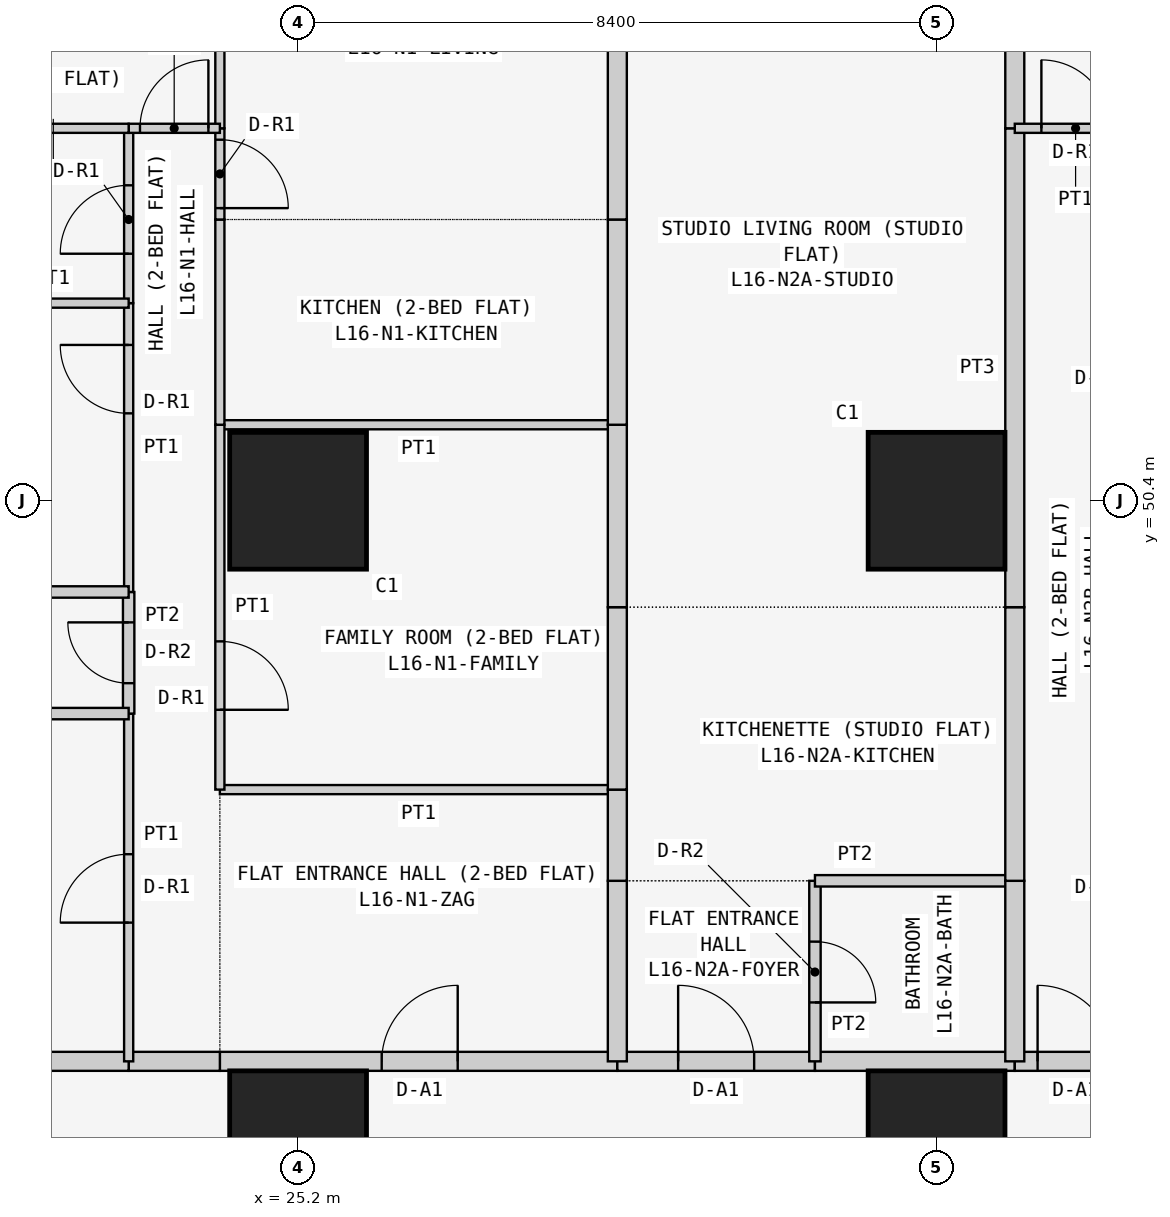
"""IFC4 building model, lengths in metres.
Left out: names, types, materials, properties, quantities, classifications, styles, units other than length and angle.
Written with IfcOpenShell. Run it as: python <this file> out.ifc"""

import sys

from ifc_helpers import new_model, si_unit, direction, frame, frame_2d, origin, origin_2d, place, context, subcontext, project, spatial, rectangle, extrude, element, fill, save


model = new_model("IFC4")
c1 = context("Model", 3, precision=1e-05, world=origin(), true_north=direction((0.0, 1.0)))
c2 = subcontext(c1, "Body", "Model", "MODEL_VIEW")
j1 = project(units=[si_unit("LENGTHUNIT", "METRE"), si_unit("PLANEANGLEUNIT", "RADIAN")], contexts=[c1])
p1 = place(None, origin())
s1 = spatial("IfcSite", under=j1, at=p1, CompositionType="ELEMENT")
p2 = place(p1, origin())
s2 = spatial("IfcBuilding", under=s1, at=p2, CompositionType="ELEMENT")
p3 = place(p2, frame((0.0, 0.0, 66.9)))
s3 = spatial("IfcBuildingStorey", under=s2, at=p3, CompositionType="ELEMENT", Elevation=66.9)
for number, where, z_axis, x_axis in (
    (1, (25.2, 42.0, 0.0), (0.0, 0.0, 1.0), (1.0, 0.0, 0.0)),
    (2, (25.2, 50.4, 0.0), (0.0, 0.0, 1.0), (1.0, 0.0, 0.0)),
    (3, (33.6, 42.0, 0.0), (0.0, 0.0, 1.0), (1.0, 0.0, 0.0)),
    (4, (33.6, 50.4, 0.0), (0.0, 0.0, 1.0), (1.0, 0.0, 0.0)),
):
    element("IfcColumn", number, at=place(p3, frame(where, z_axis=z_axis, x_axis=x_axis)), inside=s3, PredefinedType="COLUMN", context=c2, shape_type="SweptSolid", body=[
        extrude(rectangle(XDim=1.8, YDim=1.8, at=origin_2d()), origin(), (0.0, 0.0, 1.0), 3.6),
    ])
p4 = place(p3, frame((24.171, 43.025, 0.0), z_axis=(0.0, 0.0, 1.0), x_axis=(1.0, 0.0, 0.0)))
e5 = element("IfcWall", 5, at=p4, inside=s3, PredefinedType="PARTITIONING", context=c2, shape_type="SweptSolid", body=[
    extrude(rectangle(XDim=5.229, YDim=0.25, at=frame_2d((2.615, 0.0))), origin(), (0.0, 0.0, 1.0), 3.45),
])
p5 = place(p4, frame((2.129, 0.0, 0.0)))
e6 = element("IfcOpeningElement", 6, at=p5, cuts=e5, PredefinedType="OPENING", context=c2, shape_type="SweptSolid", body=[
    extrude(rectangle(XDim=1.0, YDim=2.1, at=frame_2d((0.5, 1.05))), frame((0.0, 0.135, 0.0), z_axis=(0.0, -1.0, 0.0), x_axis=(1.0, 0.0, 0.0)), (0.0, 0.0, 1.0), 0.27),
])
p6 = place(p3, frame((22.971, 43.025, 0.0), z_axis=(0.0, 0.0, 1.0), x_axis=(1.0, 0.0, 0.0)))
e7 = element("IfcWall", 7, at=p6, inside=s3, PredefinedType="PARTITIONING", context=c2, shape_type="SweptSolid", body=[
    extrude(rectangle(XDim=1.2, YDim=0.25, at=frame_2d((0.6, 0.0))), origin(), (0.0, 0.0, 1.0), 3.45),
])
p7 = place(p3, frame((16.1, 43.025, 0.0), z_axis=(0.0, 0.0, 1.0), x_axis=(1.0, 0.0, 0.0)))
e8 = element("IfcWall", 8, at=p7, inside=s3, PredefinedType="PARTITIONING", context=c2, shape_type="SweptSolid", body=[
    extrude(rectangle(XDim=6.871, YDim=0.25, at=frame_2d((3.436, 0.0))), origin(), (0.0, 0.0, 1.0), 3.45),
])
p8 = place(p3, frame((29.4, 43.025, 0.0), z_axis=(0.0, 0.0, 1.0), x_axis=(1.0, 0.0, 0.0)))
e9 = element("IfcWall", 9, at=p8, inside=s3, PredefinedType="PARTITIONING", context=c2, shape_type="SweptSolid", body=[
    extrude(rectangle(XDim=2.6, YDim=0.25, at=frame_2d((1.3, 0.0))), origin(), (0.0, 0.0, 1.0), 3.45),
])
p9 = place(p8, frame((0.8, 0.0, 0.0)))
e10 = element("IfcOpeningElement", 10, at=p9, cuts=e9, PredefinedType="OPENING", context=c2, shape_type="SweptSolid", body=[
    extrude(rectangle(XDim=1.0, YDim=2.1, at=frame_2d((0.5, 1.05))), frame((0.0, 0.135, 0.0), z_axis=(0.0, -1.0, 0.0), x_axis=(1.0, 0.0, 0.0)), (0.0, 0.0, 1.0), 0.27),
])
p10 = place(p3, frame((32.0, 43.025, 0.0), z_axis=(0.0, 0.0, 1.0), x_axis=(1.0, 0.0, 0.0)))
e11 = element("IfcWall", 11, at=p10, inside=s3, PredefinedType="PARTITIONING", context=c2, shape_type="SweptSolid", body=[
    extrude(rectangle(XDim=2.629, YDim=0.25, at=frame_2d((1.314, 0.0))), origin(), (0.0, 0.0, 1.0), 3.45),
])
p11 = place(p3, frame((34.629, 43.025, 0.0), z_axis=(0.0, 0.0, 1.0), x_axis=(1.0, 0.0, 0.0)))
e12 = element("IfcWall", 12, at=p11, inside=s3, PredefinedType="PARTITIONING", context=c2, shape_type="SweptSolid", body=[
    extrude(rectangle(XDim=1.6, YDim=0.25, at=frame_2d((0.8, 0.0))), origin(), (0.0, 0.0, 1.0), 3.45),
])
p12 = place(p11, frame((0.3, 0.0, 0.0)))
e13 = element("IfcOpeningElement", 13, at=p12, cuts=e12, PredefinedType="OPENING", context=c2, shape_type="SweptSolid", body=[
    extrude(rectangle(XDim=1.0, YDim=2.1, at=frame_2d((0.5, 1.05))), frame((0.0, 0.135, 0.0), z_axis=(0.0, -1.0, 0.0), x_axis=(1.0, 0.0, 0.0)), (0.0, 0.0, 1.0), 0.27),
])
p13 = place(p3, frame((29.4, 46.6, 0.0), z_axis=(0.0, 0.0, 1.0), x_axis=(-1.0, 0.0, 0.0)))
e14 = element("IfcWall", 14, at=p13, inside=s3, PredefinedType="PARTITIONING", context=c2, shape_type="SweptSolid", body=[
    extrude(rectangle(XDim=5.229, YDim=0.12, at=frame_2d((2.615, 0.0))), origin(), (0.0, 0.0, 1.0), 3.45),
])
p14 = place(p3, frame((29.4, 43.025, 0.0), z_axis=(0.0, 0.0, 1.0), x_axis=(0.0, 1.0, 0.0)))
e15 = element("IfcWall", 15, at=p14, inside=s3, PredefinedType="PARTITIONING", context=c2, shape_type="SweptSolid", body=[
    extrude(rectangle(XDim=2.375, YDim=0.25, at=frame_2d((1.188, 0.0))), origin(), (0.0, 0.0, 1.0), 2.848),
])
p15 = place(p3, frame((29.4, 45.4, 0.0), z_axis=(0.0, 0.0, 1.0), x_axis=(0.0, 1.0, 0.0)))
e16 = element("IfcWall", 16, at=p15, inside=s3, PredefinedType="PARTITIONING", context=c2, shape_type="SweptSolid", body=[
    extrude(rectangle(XDim=1.2, YDim=0.25, at=frame_2d((0.6, 0.0))), origin(), (0.0, 0.0, 1.0), 2.848),
])
p16 = place(p3, frame((29.4, 51.4, 0.0), z_axis=(0.0, 0.0, 1.0), x_axis=(-1.0, 0.0, 0.0)))
e17 = element("IfcWall", 17, at=p16, inside=s3, PredefinedType="PARTITIONING", context=c2, shape_type="SweptSolid", body=[
    extrude(rectangle(XDim=5.229, YDim=0.12, at=frame_2d((2.615, 0.0))), origin(), (0.0, 0.0, 1.0), 3.45),
])
p17 = place(p3, frame((24.171, 51.4, 0.0), z_axis=(0.0, 0.0, 1.0), x_axis=(0.0, -1.0, 0.0)))
e18 = element("IfcWall", 18, at=p17, inside=s3, PredefinedType="PARTITIONING", context=c2, shape_type="SweptSolid", body=[
    extrude(rectangle(XDim=4.8, YDim=0.12, at=frame_2d((2.4, 0.0))), origin(), (0.0, 0.0, 1.0), 3.45),
])
p18 = place(p17, frame((2.85, 0.0, 0.0)))
e19 = element("IfcOpeningElement", 19, at=p18, cuts=e18, PredefinedType="OPENING", context=c2, shape_type="SweptSolid", body=[
    extrude(rectangle(XDim=0.9, YDim=2.1, at=frame_2d((0.45, 1.05))), frame((0.0, 0.07, 0.0), z_axis=(0.0, -1.0, 0.0), x_axis=(1.0, 0.0, 0.0)), (0.0, 0.0, 1.0), 0.14),
])
for number, where, z_axis, x_axis in (
    (20, (29.4, 46.6, 0.0), (0.0, 0.0, 1.0), (0.0, 1.0, 0.0)),
    (21, (29.4, 49.0, 0.0), (0.0, 0.0, 1.0), (0.0, 1.0, 0.0)),
):
    element("IfcWall", number, at=place(p3, frame(where, z_axis=z_axis, x_axis=x_axis)), inside=s3, PredefinedType="PARTITIONING", context=c2, shape_type="SweptSolid", body=[
        extrude(rectangle(XDim=2.4, YDim=0.25, at=frame_2d((1.2, 0.0))), origin(), (0.0, 0.0, 1.0), 2.848),
    ])
p19 = place(p3, frame((24.171, 54.1, 0.0), z_axis=(0.0, 0.0, 1.0), x_axis=(0.0, -1.0, 0.0)))
e22 = element("IfcWall", 22, at=p19, inside=s3, PredefinedType="PARTITIONING", context=c2, shape_type="SweptSolid", body=[
    extrude(rectangle(XDim=2.7, YDim=0.12, at=frame_2d((1.35, 0.0))), origin(), (0.0, 0.0, 1.0), 3.45),
])
p20 = place(p3, frame((29.4, 51.4, 0.0), z_axis=(0.0, 0.0, 1.0), x_axis=(0.0, 1.0, 0.0)))
e23 = element("IfcWall", 23, at=p20, inside=s3, PredefinedType="PARTITIONING", context=c2, shape_type="SweptSolid", body=[
    extrude(rectangle(XDim=2.7, YDim=0.25, at=frame_2d((1.35, 0.0))), origin(), (0.0, 0.0, 1.0), 2.848),
])
p21 = place(p3, frame((24.171, 55.3, 0.0), z_axis=(0.0, 0.0, 1.0), x_axis=(0.0, -1.0, 0.0)))
e24 = element("IfcWall", 24, at=p21, inside=s3, PredefinedType="PARTITIONING", context=c2, shape_type="SweptSolid", body=[
    extrude(rectangle(XDim=1.2, YDim=0.12, at=frame_2d((0.6, 0.0))), origin(), (0.0, 0.0, 1.0), 3.45),
])
p22 = place(p21, frame((0.15, 0.0, 0.0)))
e25 = element("IfcOpeningElement", 25, at=p22, cuts=e24, PredefinedType="OPENING", context=c2, shape_type="SweptSolid", body=[
    extrude(rectangle(XDim=0.9, YDim=2.1, at=frame_2d((0.45, 1.05))), frame((0.0, 0.07, 0.0), z_axis=(0.0, -1.0, 0.0), x_axis=(1.0, 0.0, 0.0)), (0.0, 0.0, 1.0), 0.14),
])
p23 = place(p3, frame((24.171, 59.45, 0.0), z_axis=(0.0, 0.0, 1.0), x_axis=(0.0, -1.0, 0.0)))
e26 = element("IfcWall", 26, at=p23, inside=s3, PredefinedType="PARTITIONING", context=c2, shape_type="SweptSolid", body=[
    extrude(rectangle(XDim=4.15, YDim=0.12, at=frame_2d((2.075, 0.0))), origin(), (0.0, 0.0, 1.0), 3.45),
])
p24 = place(p3, frame((29.4, 54.1, 0.0), z_axis=(0.0, 0.0, 1.0), x_axis=(0.0, 1.0, 0.0)))
e27 = element("IfcWall", 27, at=p24, inside=s3, PredefinedType="PARTITIONING", context=c2, shape_type="SweptSolid", body=[
    extrude(rectangle(XDim=5.35, YDim=0.25, at=frame_2d((2.675, 0.0))), origin(), (0.0, 0.0, 1.0), 2.848),
])
p25 = place(p3, frame((22.971, 47.6, 0.0), z_axis=(0.0, 0.0, 1.0), x_axis=(0.0, -1.0, 0.0)))
e28 = element("IfcWall", 28, at=p25, inside=s3, PredefinedType="PARTITIONING", context=c2, shape_type="SweptSolid", body=[
    extrude(rectangle(XDim=4.575, YDim=0.12, at=frame_2d((2.288, 0.0))), origin(), (0.0, 0.0, 1.0), 3.45),
])
p26 = place(p25, frame((1.85, 0.0, 0.0)))
e29 = element("IfcOpeningElement", 29, at=p26, cuts=e28, PredefinedType="OPENING", context=c2, shape_type="SweptSolid", body=[
    extrude(rectangle(XDim=0.9, YDim=2.1, at=frame_2d((0.45, 1.05))), frame((0.0, 0.07, 0.0), z_axis=(0.0, -1.0, 0.0), x_axis=(1.0, 0.0, 0.0)), (0.0, 0.0, 1.0), 0.14),
])
p27 = place(p3, frame((22.971, 49.2, 0.0), z_axis=(0.0, 0.0, 1.0), x_axis=(0.0, -1.0, 0.0)))
e30 = element("IfcWall", 30, at=p27, inside=s3, PredefinedType="PARTITIONING", context=c2, shape_type="SweptSolid", body=[
    extrude(rectangle(XDim=1.6, YDim=0.15, at=frame_2d((0.8, 0.0))), origin(), (0.0, 0.0, 1.0), 3.45),
])
p28 = place(p27, frame((0.4, 0.0, 0.0)))
e31 = element("IfcOpeningElement", 31, at=p28, cuts=e30, PredefinedType="OPENING", context=c2, shape_type="SweptSolid", body=[
    extrude(rectangle(XDim=0.8, YDim=2.1, at=frame_2d((0.4, 1.05))), frame((0.0, 0.085, 0.0), z_axis=(0.0, -1.0, 0.0), x_axis=(1.0, 0.0, 0.0)), (0.0, 0.0, 1.0), 0.17),
])
p29 = place(p3, frame((22.971, 53.0, 0.0), z_axis=(0.0, 0.0, 1.0), x_axis=(0.0, -1.0, 0.0)))
e32 = element("IfcWall", 32, at=p29, inside=s3, PredefinedType="PARTITIONING", context=c2, shape_type="SweptSolid", body=[
    extrude(rectangle(XDim=3.8, YDim=0.12, at=frame_2d((1.9, 0.0))), origin(), (0.0, 0.0, 1.0), 3.45),
])
p30 = place(p29, frame((0.55, 0.0, 0.0)))
e33 = element("IfcOpeningElement", 33, at=p30, cuts=e32, PredefinedType="OPENING", context=c2, shape_type="SweptSolid", body=[
    extrude(rectangle(XDim=0.9, YDim=2.1, at=frame_2d((0.45, 1.05))), frame((0.0, 0.07, 0.0), z_axis=(0.0, -1.0, 0.0), x_axis=(1.0, 0.0, 0.0)), (0.0, 0.0, 1.0), 0.14),
])
p31 = place(p3, frame((22.971, 55.3, 0.0), z_axis=(0.0, 0.0, 1.0), x_axis=(0.0, -1.0, 0.0)))
e34 = element("IfcWall", 34, at=p31, inside=s3, PredefinedType="PARTITIONING", context=c2, shape_type="SweptSolid", body=[
    extrude(rectangle(XDim=2.3, YDim=0.12, at=frame_2d((1.15, 0.0))), origin(), (0.0, 0.0, 1.0), 3.45),
])
p32 = place(p31, frame((0.75, 0.0, 0.0)))
e35 = element("IfcOpeningElement", 35, at=p32, cuts=e34, PredefinedType="OPENING", context=c2, shape_type="SweptSolid", body=[
    extrude(rectangle(XDim=0.9, YDim=2.1, at=frame_2d((0.45, 1.05))), frame((0.0, 0.07, 0.0), z_axis=(0.0, -1.0, 0.0), x_axis=(1.0, 0.0, 0.0)), (0.0, 0.0, 1.0), 0.14),
])
p33 = place(p3, frame((24.171, 55.3, 0.0), z_axis=(0.0, 0.0, 1.0), x_axis=(-1.0, 0.0, 0.0)))
e36 = element("IfcWall", 36, at=p33, inside=s3, PredefinedType="PARTITIONING", context=c2, shape_type="SweptSolid", body=[
    extrude(rectangle(XDim=1.2, YDim=0.12, at=frame_2d((0.6, 0.0))), origin(), (0.0, 0.0, 1.0), 3.45),
])
p34 = place(p33, frame((0.151, 0.0, 0.0)))
e37 = element("IfcOpeningElement", 37, at=p34, cuts=e36, PredefinedType="OPENING", context=c2, shape_type="SweptSolid", body=[
    extrude(rectangle(XDim=0.9, YDim=2.1, at=frame_2d((0.45, 1.05))), frame((0.0, 0.07, 0.0), z_axis=(0.0, -1.0, 0.0), x_axis=(1.0, 0.0, 0.0)), (0.0, 0.0, 1.0), 0.14),
])
for number, where, z_axis, x_axis in (
    (38, (22.971, 47.6, 0.0), (0.0, 0.0, 1.0), (-1.0, 0.0, 0.0)),
    (39, (22.971, 49.2, 0.0), (0.0, 0.0, 1.0), (-1.0, 0.0, 0.0)),
):
    element("IfcWall", number, at=place(p3, frame(where, z_axis=z_axis, x_axis=x_axis)), inside=s3, PredefinedType="PARTITIONING", context=c2, shape_type="SweptSolid", body=[
        extrude(rectangle(XDim=6.871, YDim=0.15, at=frame_2d((3.436, 0.0))), origin(), (0.0, 0.0, 1.0), 3.45),
    ])
for number, where, z_axis, x_axis in (
    (40, (20.971, 53.0, 0.0), (0.0, 0.0, 1.0), (1.0, 0.0, 0.0)),
    (41, (22.971, 55.3, 0.0), (0.0, 0.0, 1.0), (-1.0, 0.0, 0.0)),
):
    element("IfcWall", number, at=place(p3, frame(where, z_axis=z_axis, x_axis=x_axis)), inside=s3, PredefinedType="PARTITIONING", context=c2, shape_type="SweptSolid", body=[
        extrude(rectangle(XDim=2.0, YDim=0.12, at=frame_2d((1.0, 0.0))), origin(), (0.0, 0.0, 1.0), 3.45),
    ])
p35 = place(p3, frame((32.0, 45.4, 0.0), z_axis=(0.0, 0.0, 1.0), x_axis=(0.0, -1.0, 0.0)))
e42 = element("IfcWall", 42, at=p35, inside=s3, PredefinedType="PARTITIONING", context=c2, shape_type="SweptSolid", body=[
    extrude(rectangle(XDim=2.375, YDim=0.15, at=frame_2d((1.188, 0.0))), origin(), (0.0, 0.0, 1.0), 3.45),
])
p36 = place(p35, frame((0.8, 0.0, 0.0)))
e43 = element("IfcOpeningElement", 43, at=p36, cuts=e42, PredefinedType="OPENING", context=c2, shape_type="SweptSolid", body=[
    extrude(rectangle(XDim=0.8, YDim=2.1, at=frame_2d((0.4, 1.05))), frame((0.0, 0.085, 0.0), z_axis=(0.0, -1.0, 0.0), x_axis=(1.0, 0.0, 0.0)), (0.0, 0.0, 1.0), 0.17),
])
p37 = place(p3, frame((32.0, 45.4, 0.0), z_axis=(0.0, 0.0, 1.0), x_axis=(1.0, 0.0, 0.0)))
e44 = element("IfcWall", 44, at=p37, inside=s3, PredefinedType="PARTITIONING", context=c2, shape_type="SweptSolid", body=[
    extrude(rectangle(XDim=2.629, YDim=0.15, at=frame_2d((1.314, 0.0))), origin(), (0.0, 0.0, 1.0), 3.45),
])
p38 = place(p3, frame((34.629, 45.4, 0.0), z_axis=(0.0, 0.0, 1.0), x_axis=(0.0, -1.0, 0.0)))
e45 = element("IfcWall", 45, at=p38, inside=s3, PredefinedType="PARTITIONING", context=c2, shape_type="SweptSolid", body=[
    extrude(rectangle(XDim=2.375, YDim=0.25, at=frame_2d((1.188, 0.0))), origin(), (0.0, 0.0, 1.0), 3.45),
])
p39 = place(p3, frame((34.629, 49.0, 0.0), z_axis=(0.0, 0.0, 1.0), x_axis=(0.0, -1.0, 0.0)))
e46 = element("IfcWall", 46, at=p39, inside=s3, PredefinedType="PARTITIONING", context=c2, shape_type="SweptSolid", body=[
    extrude(rectangle(XDim=3.6, YDim=0.25, at=frame_2d((1.8, 0.0))), origin(), (0.0, 0.0, 1.0), 3.45),
])
p40 = place(p3, frame((34.629, 55.3, 0.0), z_axis=(0.0, 0.0, 1.0), x_axis=(0.0, -1.0, 0.0)))
e47 = element("IfcWall", 47, at=p40, inside=s3, PredefinedType="PARTITIONING", context=c2, shape_type="SweptSolid", body=[
    extrude(rectangle(XDim=6.3, YDim=0.25, at=frame_2d((3.15, 0.0))), origin(), (0.0, 0.0, 1.0), 3.45),
])
p41 = place(p3, frame((34.629, 59.45, 0.0), z_axis=(0.0, 0.0, 1.0), x_axis=(0.0, -1.0, 0.0)))
e48 = element("IfcWall", 48, at=p41, inside=s3, PredefinedType="PARTITIONING", context=c2, shape_type="SweptSolid", body=[
    extrude(rectangle(XDim=4.15, YDim=0.25, at=frame_2d((2.075, 0.0))), origin(), (0.0, 0.0, 1.0), 3.45),
])
p42 = place(p3, frame((34.629, 55.3, 0.0), z_axis=(0.0, 0.0, 1.0), x_axis=(1.0, 0.0, 0.0)))
e49 = element("IfcWall", 49, at=p42, inside=s3, PredefinedType="PARTITIONING", context=c2, shape_type="SweptSolid", body=[
    extrude(rectangle(XDim=1.6, YDim=0.12, at=frame_2d((0.8, 0.0))), origin(), (0.0, 0.0, 1.0), 3.45),
])
p43 = place(p42, frame((0.35, 0.0, 0.0)))
e50 = element("IfcOpeningElement", 50, at=p43, cuts=e49, PredefinedType="OPENING", context=c2, shape_type="SweptSolid", body=[
    extrude(rectangle(XDim=0.9, YDim=2.1, at=frame_2d((0.45, 1.05))), frame((0.0, 0.07, 0.0), z_axis=(0.0, -1.0, 0.0), x_axis=(1.0, 0.0, 0.0)), (0.0, 0.0, 1.0), 0.14),
])
p44 = place(p5, origin())
e51 = element("IfcDoor", 51, at=p44, inside=s3, OperationType="SINGLE_SWING_RIGHT", PredefinedType="DOOR", context=c2, shape_type="SweptSolid", body=[
    extrude(rectangle(XDim=1.0, YDim=2.1, at=frame_2d((0.5, 1.05))), frame((0.0, 0.025, 0.0), z_axis=(0.0, -1.0, 0.0), x_axis=(1.0, 0.0, 0.0)), (0.0, 0.0, 1.0), 0.05),
])
fill(e6, e51)
p45 = place(p18, origin())
e52 = element("IfcDoor", 52, at=p45, inside=s3, OperationType="SINGLE_SWING_RIGHT", PredefinedType="DOOR", context=c2, shape_type="SweptSolid", body=[
    extrude(rectangle(XDim=0.9, YDim=2.1, at=frame_2d((0.45, 1.05))), frame((0.0, 0.025, 0.0), z_axis=(0.0, -1.0, 0.0), x_axis=(1.0, 0.0, 0.0)), (0.0, 0.0, 1.0), 0.05),
])
fill(e19, e52)
p46 = place(p22, origin())
e53 = element("IfcDoor", 53, at=p46, inside=s3, OperationType="SINGLE_SWING_RIGHT", PredefinedType="DOOR", context=c2, shape_type="SweptSolid", body=[
    extrude(rectangle(XDim=0.9, YDim=2.1, at=frame_2d((0.45, 1.05))), frame((0.0, 0.025, 0.0), z_axis=(0.0, -1.0, 0.0), x_axis=(1.0, 0.0, 0.0)), (0.0, 0.0, 1.0), 0.05),
])
fill(e25, e53)
p47 = place(p26, frame((0.9, 0.0, 0.0), z_axis=(0.0, 0.0, 1.0), x_axis=(-1.0, 0.0, 0.0)))
e54 = element("IfcDoor", 54, at=p47, inside=s3, OperationType="SINGLE_SWING_LEFT", PredefinedType="DOOR", context=c2, shape_type="SweptSolid", body=[
    extrude(rectangle(XDim=0.9, YDim=2.1, at=frame_2d((0.45, 1.05))), frame((0.0, 0.025, 0.0), z_axis=(0.0, -1.0, 0.0), x_axis=(1.0, 0.0, 0.0)), (0.0, 0.0, 1.0), 0.05),
])
fill(e29, e54)
p48 = place(p28, frame((0.8, 0.0, 0.0), z_axis=(0.0, 0.0, 1.0), x_axis=(-1.0, 0.0, 0.0)))
e55 = element("IfcDoor", 55, at=p48, inside=s3, OperationType="SINGLE_SWING_RIGHT", PredefinedType="DOOR", context=c2, shape_type="SweptSolid", body=[
    extrude(rectangle(XDim=0.8, YDim=2.1, at=frame_2d((0.4, 1.05))), frame((0.0, 0.025, 0.0), z_axis=(0.0, -1.0, 0.0), x_axis=(1.0, 0.0, 0.0)), (0.0, 0.0, 1.0), 0.05),
])
fill(e31, e55)
p49 = place(p30, frame((0.9, 0.0, 0.0), z_axis=(0.0, 0.0, 1.0), x_axis=(-1.0, 0.0, 0.0)))
e56 = element("IfcDoor", 56, at=p49, inside=s3, OperationType="SINGLE_SWING_RIGHT", PredefinedType="DOOR", context=c2, shape_type="SweptSolid", body=[
    extrude(rectangle(XDim=0.9, YDim=2.1, at=frame_2d((0.45, 1.05))), frame((0.0, 0.025, 0.0), z_axis=(0.0, -1.0, 0.0), x_axis=(1.0, 0.0, 0.0)), (0.0, 0.0, 1.0), 0.05),
])
fill(e33, e56)
p50 = place(p32, frame((0.9, 0.0, 0.0), z_axis=(0.0, 0.0, 1.0), x_axis=(-1.0, 0.0, 0.0)))
e57 = element("IfcDoor", 57, at=p50, inside=s3, OperationType="SINGLE_SWING_LEFT", PredefinedType="DOOR", context=c2, shape_type="SweptSolid", body=[
    extrude(rectangle(XDim=0.9, YDim=2.1, at=frame_2d((0.45, 1.05))), frame((0.0, 0.025, 0.0), z_axis=(0.0, -1.0, 0.0), x_axis=(1.0, 0.0, 0.0)), (0.0, 0.0, 1.0), 0.05),
])
fill(e35, e57)
p51 = place(p34, frame((0.9, 0.0, 0.0), z_axis=(0.0, 0.0, 1.0), x_axis=(-1.0, 0.0, 0.0)))
e58 = element("IfcDoor", 58, at=p51, inside=s3, OperationType="SINGLE_SWING_RIGHT", PredefinedType="DOOR", context=c2, shape_type="SweptSolid", body=[
    extrude(rectangle(XDim=0.9, YDim=2.1, at=frame_2d((0.45, 1.05))), frame((0.0, 0.025, 0.0), z_axis=(0.0, -1.0, 0.0), x_axis=(1.0, 0.0, 0.0)), (0.0, 0.0, 1.0), 0.05),
])
fill(e37, e58)
p52 = place(p9, origin())
e59 = element("IfcDoor", 59, at=p52, inside=s3, OperationType="SINGLE_SWING_LEFT", PredefinedType="DOOR", context=c2, shape_type="SweptSolid", body=[
    extrude(rectangle(XDim=1.0, YDim=2.1, at=frame_2d((0.5, 1.05))), frame((0.0, 0.025, 0.0), z_axis=(0.0, -1.0, 0.0), x_axis=(1.0, 0.0, 0.0)), (0.0, 0.0, 1.0), 0.05),
])
fill(e10, e59)
p53 = place(p36, origin())
e60 = element("IfcDoor", 60, at=p53, inside=s3, OperationType="SINGLE_SWING_RIGHT", PredefinedType="DOOR", context=c2, shape_type="SweptSolid", body=[
    extrude(rectangle(XDim=0.8, YDim=2.1, at=frame_2d((0.4, 1.05))), frame((0.0, 0.025, 0.0), z_axis=(0.0, -1.0, 0.0), x_axis=(1.0, 0.0, 0.0)), (0.0, 0.0, 1.0), 0.05),
])
fill(e43, e60)
p54 = place(p12, origin())
e61 = element("IfcDoor", 61, at=p54, inside=s3, OperationType="SINGLE_SWING_LEFT", PredefinedType="DOOR", context=c2, shape_type="SweptSolid", body=[
    extrude(rectangle(XDim=1.0, YDim=2.1, at=frame_2d((0.5, 1.05))), frame((0.0, 0.025, 0.0), z_axis=(0.0, -1.0, 0.0), x_axis=(1.0, 0.0, 0.0)), (0.0, 0.0, 1.0), 0.05),
])
fill(e13, e61)
p55 = place(p43, origin())
e62 = element("IfcDoor", 62, at=p55, inside=s3, OperationType="SINGLE_SWING_LEFT", PredefinedType="DOOR", context=c2, shape_type="SweptSolid", body=[
    extrude(rectangle(XDim=0.9, YDim=2.1, at=frame_2d((0.45, 1.05))), frame((0.0, 0.025, 0.0), z_axis=(0.0, -1.0, 0.0), x_axis=(1.0, 0.0, 0.0)), (0.0, 0.0, 1.0), 0.05),
])
fill(e50, e62)
save(model, sys.argv[1])
